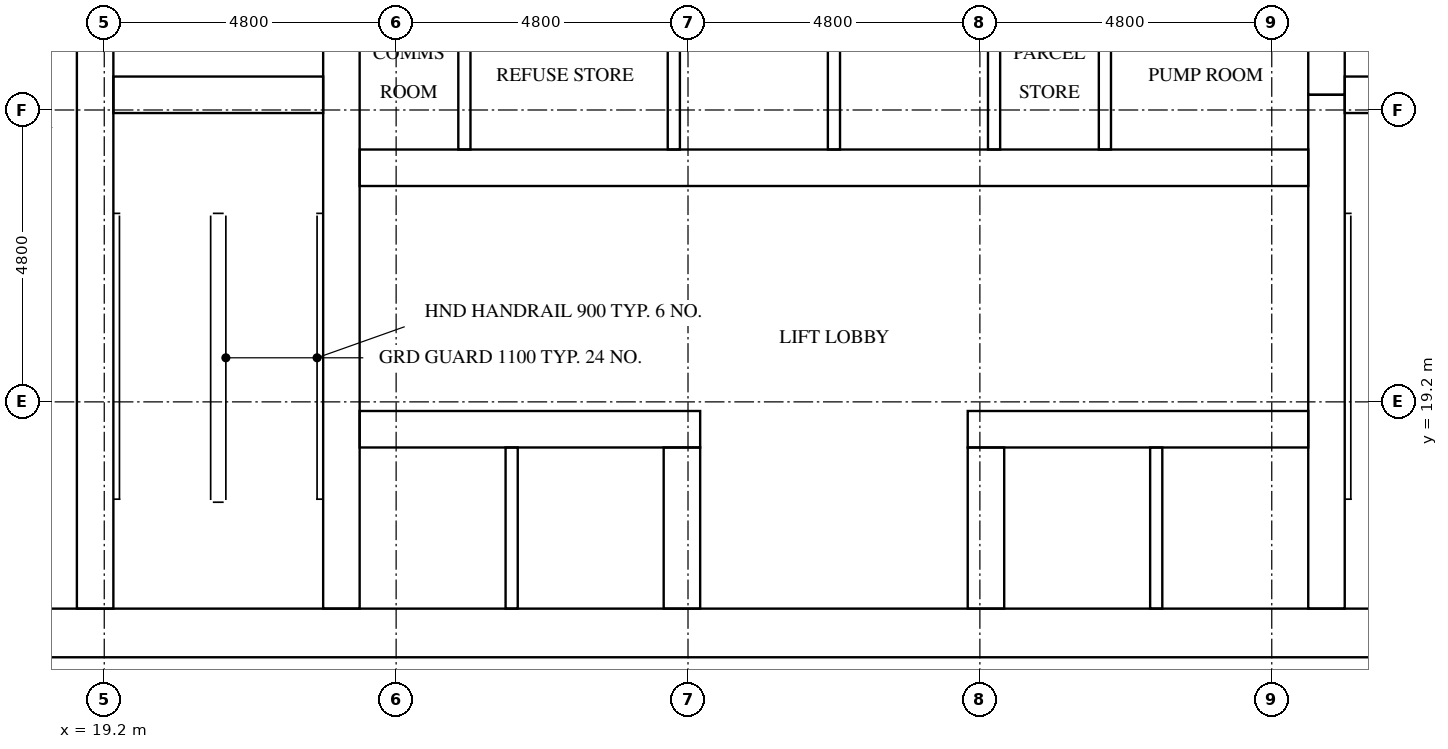
"""IFC4 building model, lengths in metres.
Left out: names, types, materials, properties, quantities, classifications, styles, units other than length and angle.
Written with IfcOpenShell. Run it as: python <this file> out.ifc"""

import sys

from ifc_helpers import new_model, si_unit, direction, frame, frame_2d, origin, place, context, subcontext, project, spatial, rectangle, extrude, element, fill, save


model = new_model("IFC4")
c1 = context("Model", 3, precision=1e-05, world=origin(), true_north=direction((0.0, 1.0)))
c2 = subcontext(c1, "Body", "Model", "MODEL_VIEW")
j1 = project(units=[si_unit("LENGTHUNIT", "METRE"), si_unit("PLANEANGLEUNIT", "RADIAN")], contexts=[c1])
p1 = place(None, origin())
s1 = spatial("IfcSite", under=j1, at=p1, CompositionType="ELEMENT")
p2 = place(p1, origin())
s2 = spatial("IfcBuilding", under=s1, at=p2, CompositionType="ELEMENT")
p3 = place(p2, frame((0.0, 0.0, 143.6)))
s3 = spatial("IfcBuildingStorey", under=s2, at=p3, CompositionType="ELEMENT", Elevation=143.6)
p4 = place(p3, frame((15.0, 15.4, 0.0), z_axis=(0.0, 0.0, 1.0), x_axis=(1.0, 0.0, 0.0)))
e1 = element("IfcWall", 1, at=p4, inside=s3, PredefinedType="SHEAR", context=c2, shape_type="SweptSolid", body=[
    extrude(rectangle(XDim=32.4, YDim=0.8, at=frame_2d((16.2, 0.0))), origin(), (0.0, 0.0, 1.0), 5.1),
])
p5 = place(p4, frame((15.3, 0.0, 0.0)))
e2 = element("IfcOpeningElement", 2, at=p5, cuts=e1, PredefinedType="OPENING", context=c2, shape_type="SweptSolid", body=[
    extrude(rectangle(XDim=1.8, YDim=2.1, at=frame_2d((0.9, 1.05))), frame((0.0, 0.41, 0.0), z_axis=(0.0, -1.0, 0.0), x_axis=(1.0, 0.0, 0.0)), (0.0, 0.0, 1.0), 0.82),
])
p6 = place(p3, frame((19.05, 15.8, 0.0), z_axis=(0.0, 0.0, 1.0), x_axis=(0.0, 1.0, 0.0)))
e3 = element("IfcWall", 3, at=p6, inside=s3, PredefinedType="SHEAR", context=c2, shape_type="SweptSolid", body=[
    extrude(rectangle(XDim=15.15, YDim=0.6, at=frame_2d((7.575, 0.0))), origin(), (0.0, 0.0, 1.0), 5.1),
])
p7 = place(p6, frame((9.65, 0.0, 0.0)))
e4 = element("IfcOpeningElement", 4, at=p7, cuts=e3, PredefinedType="OPENING", context=c2, shape_type="SweptSolid", body=[
    extrude(rectangle(XDim=1.1, YDim=2.1, at=frame_2d((0.55, 1.05))), frame((0.0, 0.31, 0.0), z_axis=(0.0, -1.0, 0.0), x_axis=(1.0, 0.0, 0.0)), (0.0, 0.0, 1.0), 0.62),
])
p8 = place(p6, frame((13.15, 0.0, 0.0)))
e5 = element("IfcOpeningElement", 5, at=p8, cuts=e3, PredefinedType="OPENING", context=c2, shape_type="SweptSolid", body=[
    extrude(rectangle(XDim=1.1, YDim=2.1, at=frame_2d((0.55, 1.05))), frame((0.0, 0.31, 0.0), z_axis=(0.0, -1.0, 0.0), x_axis=(1.0, 0.0, 0.0)), (0.0, 0.0, 1.0), 0.62),
])
p9 = place(p6, frame((0.4, 0.0, 0.0)))
e6 = element("IfcOpeningElement", 6, at=p9, cuts=e3, PredefinedType="OPENING", context=c2, shape_type="SweptSolid", body=[
    extrude(rectangle(XDim=1.2, YDim=2.1, at=frame_2d((0.6, 1.05))), frame((0.0, 0.31, 0.0), z_axis=(0.0, -1.0, 0.0), x_axis=(1.0, 0.0, 0.0)), (0.0, 0.0, 1.0), 0.62),
])
p10 = place(p3, frame((23.1, 15.8, 0.0), z_axis=(0.0, 0.0, 1.0), x_axis=(0.0, 1.0, 0.0)))
e7 = element("IfcWall", 7, at=p10, inside=s3, PredefinedType="SHEAR", context=c2, shape_type="SweptSolid", body=[
    extrude(rectangle(XDim=21.2, YDim=0.6, at=frame_2d((10.6, 0.0))), origin(), (0.0, 0.0, 1.0), 5.1),
])
p11 = place(p3, frame((39.3, 15.8, 0.0), z_axis=(0.0, 0.0, 1.0), x_axis=(0.0, 1.0, 0.0)))
e8 = element("IfcWall", 8, at=p11, inside=s3, PredefinedType="SHEAR", context=c2, shape_type="SweptSolid", body=[
    extrude(rectangle(XDim=8.45, YDim=0.6, at=frame_2d((4.225, 0.0))), origin(), (0.0, 0.0, 1.0), 5.1),
])
p12 = place(p3, frame((39.3, 24.25, 0.0), z_axis=(0.0, 0.0, 1.0), x_axis=(0.0, 1.0, 0.0)))
e9 = element("IfcWall", 9, at=p12, inside=s3, PredefinedType="SHEAR", context=c2, shape_type="SweptSolid", body=[
    extrude(rectangle(XDim=3.5, YDim=0.6, at=frame_2d((1.75, 0.0))), origin(), (0.0, 0.0, 1.0), 5.1),
])
for number, where, z_axis, x_axis in (
    (10, (19.35, 24.25, 0.0), (0.0, 0.0, 1.0), (1.0, 0.0, 0.0)),
    (11, (39.6, 24.25, 0.0), (0.0, 0.0, 1.0), (1.0, 0.0, 0.0)),
):
    element("IfcWall", number, at=place(p3, frame(where, z_axis=z_axis, x_axis=x_axis)), inside=s3, PredefinedType="SHEAR", context=c2, shape_type="SweptSolid", body=[
        extrude(rectangle(XDim=3.45, YDim=0.6, at=frame_2d((1.725, 0.0))), origin(), (0.0, 0.0, 1.0), 5.1),
    ])
p13 = place(p3, frame((23.4, 18.75, 0.0), z_axis=(0.0, 0.0, 1.0), x_axis=(1.0, 0.0, 0.0)))
e12 = element("IfcWall", 12, at=p13, inside=s3, PredefinedType="SHEAR", context=c2, shape_type="SweptSolid", body=[
    extrude(rectangle(XDim=5.6, YDim=0.6, at=frame_2d((2.8, 0.0))), origin(), (0.0, 0.0, 1.0), 5.1),
])
p14 = place(p13, frame((0.65, 0.0, 0.0)))
e13 = element("IfcOpeningElement", 13, at=p14, cuts=e12, PredefinedType="OPENING", context=c2, shape_type="SweptSolid", body=[
    extrude(rectangle(XDim=1.1, YDim=2.1, at=frame_2d((0.55, 1.05))), frame((0.0, 0.31, 0.0), z_axis=(0.0, -1.0, 0.0), x_axis=(1.0, 0.0, 0.0)), (0.0, 0.0, 1.0), 0.62),
])
p15 = place(p13, frame((3.25, 0.0, 0.0)))
e14 = element("IfcOpeningElement", 14, at=p15, cuts=e12, PredefinedType="OPENING", context=c2, shape_type="SweptSolid", body=[
    extrude(rectangle(XDim=1.1, YDim=2.1, at=frame_2d((0.55, 1.05))), frame((0.0, 0.31, 0.0), z_axis=(0.0, -1.0, 0.0), x_axis=(1.0, 0.0, 0.0)), (0.0, 0.0, 1.0), 0.62),
])
p16 = place(p3, frame((33.4, 18.75, 0.0), z_axis=(0.0, 0.0, 1.0), x_axis=(1.0, 0.0, 0.0)))
e15 = element("IfcWall", 15, at=p16, inside=s3, PredefinedType="SHEAR", context=c2, shape_type="SweptSolid", body=[
    extrude(rectangle(XDim=5.6, YDim=0.6, at=frame_2d((2.8, 0.0))), origin(), (0.0, 0.0, 1.0), 5.1),
])
p17 = place(p16, frame((1.25, 0.0, 0.0)))
e16 = element("IfcOpeningElement", 16, at=p17, cuts=e15, PredefinedType="OPENING", context=c2, shape_type="SweptSolid", body=[
    extrude(rectangle(XDim=1.1, YDim=2.1, at=frame_2d((0.55, 1.05))), frame((0.0, 0.31, 0.0), z_axis=(0.0, -1.0, 0.0), x_axis=(1.0, 0.0, 0.0)), (0.0, 0.0, 1.0), 0.62),
])
p18 = place(p16, frame((3.85, 0.0, 0.0)))
e17 = element("IfcOpeningElement", 17, at=p18, cuts=e15, PredefinedType="OPENING", context=c2, shape_type="SweptSolid", body=[
    extrude(rectangle(XDim=1.1, YDim=2.1, at=frame_2d((0.55, 1.05))), frame((0.0, 0.31, 0.0), z_axis=(0.0, -1.0, 0.0), x_axis=(1.0, 0.0, 0.0)), (0.0, 0.0, 1.0), 0.62),
])
p19 = place(p3, frame((23.4, 23.05, 0.0), z_axis=(0.0, 0.0, 1.0), x_axis=(1.0, 0.0, 0.0)))
e18 = element("IfcWall", 18, at=p19, inside=s3, PredefinedType="SHEAR", context=c2, shape_type="SweptSolid", body=[
    extrude(rectangle(XDim=15.6, YDim=0.6, at=frame_2d((7.8, 0.0))), origin(), (0.0, 0.0, 1.0), 5.1),
])
p20 = place(p19, frame((0.311, 0.0, 0.0)))
e19 = element("IfcOpeningElement", 19, at=p20, cuts=e18, PredefinedType="OPENING", context=c2, shape_type="SweptSolid", body=[
    extrude(rectangle(XDim=1.0, YDim=2.1, at=frame_2d((0.5, 1.05))), frame((0.0, 0.31, 0.0), z_axis=(0.0, -1.0, 0.0), x_axis=(1.0, 0.0, 0.0)), (0.0, 0.0, 1.0), 0.62),
])
p21 = place(p19, frame((2.945, 0.0, 0.0)))
e20 = element("IfcOpeningElement", 20, at=p21, cuts=e18, PredefinedType="OPENING", context=c2, shape_type="SweptSolid", body=[
    extrude(rectangle(XDim=1.0, YDim=2.1, at=frame_2d((0.5, 1.05))), frame((0.0, 0.31, 0.0), z_axis=(0.0, -1.0, 0.0), x_axis=(1.0, 0.0, 0.0)), (0.0, 0.0, 1.0), 0.62),
])
p22 = place(p19, frame((10.845, 0.0, 0.0)))
e21 = element("IfcOpeningElement", 21, at=p22, cuts=e18, PredefinedType="OPENING", context=c2, shape_type="SweptSolid", body=[
    extrude(rectangle(XDim=1.0, YDim=2.1, at=frame_2d((0.5, 1.05))), frame((0.0, 0.31, 0.0), z_axis=(0.0, -1.0, 0.0), x_axis=(1.0, 0.0, 0.0)), (0.0, 0.0, 1.0), 0.62),
])
p23 = place(p19, frame((13.478, 0.0, 0.0)))
e22 = element("IfcOpeningElement", 22, at=p23, cuts=e18, PredefinedType="OPENING", context=c2, shape_type="SweptSolid", body=[
    extrude(rectangle(XDim=1.0, YDim=2.1, at=frame_2d((0.5, 1.05))), frame((0.0, 0.31, 0.0), z_axis=(0.0, -1.0, 0.0), x_axis=(1.0, 0.0, 0.0)), (0.0, 0.0, 1.0), 0.62),
])
for number, where, z_axis, x_axis in (
    (23, (28.7, 15.8, 0.0), (0.0, 0.0, 1.0), (0.0, 1.0, 0.0)),
    (24, (33.7, 15.8, 0.0), (0.0, 0.0, 1.0), (0.0, 1.0, 0.0)),
):
    element("IfcWall", number, at=place(p3, frame(where, z_axis=z_axis, x_axis=x_axis)), inside=s3, PredefinedType="SHEAR", context=c2, shape_type="SweptSolid", body=[
        extrude(rectangle(XDim=2.65, YDim=0.6, at=frame_2d((1.325, 0.0))), origin(), (0.0, 0.0, 1.0), 5.1),
    ])
for number, where, z_axis, x_axis in (
    (25, (28.567, 23.35, 0.0), (0.0, 0.0, 1.0), (0.0, 1.0, 0.0)),
    (26, (31.2, 23.35, 0.0), (0.0, 0.0, 1.0), (0.0, 1.0, 0.0)),
    (27, (33.833, 23.35, 0.0), (0.0, 0.0, 1.0), (0.0, 1.0, 0.0)),
):
    element("IfcWall", number, at=place(p3, frame(where, z_axis=z_axis, x_axis=x_axis)), inside=s3, PredefinedType="SOLIDWALL", context=c2, shape_type="SweptSolid", body=[
        extrude(rectangle(XDim=2.5, YDim=0.2, at=frame_2d((1.25, 0.0))), origin(), (0.0, 0.0, 1.0), 5.1),
    ])
for number, where, z_axis, x_axis in (
    (28, (25.9, 15.8, 0.0), (0.0, 0.0, 1.0), (0.0, 1.0, 0.0)),
    (29, (36.5, 15.8, 0.0), (0.0, 0.0, 1.0), (0.0, 1.0, 0.0)),
):
    element("IfcWall", number, at=place(p3, frame(where, z_axis=z_axis, x_axis=x_axis)), inside=s3, PredefinedType="SOLIDWALL", context=c2, shape_type="SweptSolid", body=[
        extrude(rectangle(XDim=2.65, YDim=0.2, at=frame_2d((1.325, 0.0))), origin(), (0.0, 0.0, 1.0), 5.1),
    ])
for number, where, z_axis, x_axis in (
    (30, (25.123, 23.35, 0.0), (0.0, 0.0, 1.0), (0.0, 1.0, 0.0)),
    (31, (35.656, 23.35, 0.0), (0.0, 0.0, 1.0), (0.0, 1.0, 0.0)),
):
    element("IfcWall", number, at=place(p3, frame(where, z_axis=z_axis, x_axis=x_axis)), inside=s3, PredefinedType="PARTITIONING", context=c2, shape_type="SweptSolid", body=[
        extrude(rectangle(XDim=2.5, YDim=0.2, at=frame_2d((1.25, 0.0))), origin(), (0.0, 0.0, 1.0), 5.1),
    ])
p24 = place(p14, origin())
e32 = element("IfcDoor", 32, at=p24, inside=s3, OperationType="DOUBLE_DOOR_SLIDING", PredefinedType="DOOR", context=c2, shape_type="SweptSolid", body=[
    extrude(rectangle(XDim=1.1, YDim=2.1, at=frame_2d((0.55, 1.05))), frame((0.0, 0.025, 0.0), z_axis=(0.0, -1.0, 0.0), x_axis=(1.0, 0.0, 0.0)), (0.0, 0.0, 1.0), 0.05),
])
fill(e13, e32)
p25 = place(p15, origin())
e33 = element("IfcDoor", 33, at=p25, inside=s3, OperationType="DOUBLE_DOOR_SLIDING", PredefinedType="DOOR", context=c2, shape_type="SweptSolid", body=[
    extrude(rectangle(XDim=1.1, YDim=2.1, at=frame_2d((0.55, 1.05))), frame((0.0, 0.025, 0.0), z_axis=(0.0, -1.0, 0.0), x_axis=(1.0, 0.0, 0.0)), (0.0, 0.0, 1.0), 0.05),
])
fill(e14, e33)
p26 = place(p17, origin())
e34 = element("IfcDoor", 34, at=p26, inside=s3, OperationType="DOUBLE_DOOR_SLIDING", PredefinedType="DOOR", context=c2, shape_type="SweptSolid", body=[
    extrude(rectangle(XDim=1.1, YDim=2.1, at=frame_2d((0.55, 1.05))), frame((0.0, 0.025, 0.0), z_axis=(0.0, -1.0, 0.0), x_axis=(1.0, 0.0, 0.0)), (0.0, 0.0, 1.0), 0.05),
])
fill(e16, e34)
p27 = place(p18, origin())
e35 = element("IfcDoor", 35, at=p27, inside=s3, OperationType="DOUBLE_DOOR_SLIDING", PredefinedType="DOOR", context=c2, shape_type="SweptSolid", body=[
    extrude(rectangle(XDim=1.1, YDim=2.1, at=frame_2d((0.55, 1.05))), frame((0.0, 0.025, 0.0), z_axis=(0.0, -1.0, 0.0), x_axis=(1.0, 0.0, 0.0)), (0.0, 0.0, 1.0), 0.05),
])
fill(e17, e35)
p28 = place(p9, frame((1.2, 0.0, 0.0), z_axis=(0.0, 0.0, 1.0), x_axis=(-1.0, 0.0, 0.0)))
e36 = element("IfcDoor", 36, at=p28, inside=s3, OperationType="SINGLE_SWING_LEFT", PredefinedType="DOOR", context=c2, shape_type="SweptSolid", body=[
    extrude(rectangle(XDim=1.2, YDim=2.1, at=frame_2d((0.6, 1.05))), frame((0.0, 0.025, 0.0), z_axis=(0.0, -1.0, 0.0), x_axis=(1.0, 0.0, 0.0)), (0.0, 0.0, 1.0), 0.05),
])
fill(e6, e36)
p29 = place(p5, frame((1.8, 0.0, 0.0), z_axis=(0.0, 0.0, 1.0), x_axis=(-1.0, 0.0, 0.0)))
e37 = element("IfcDoor", 37, at=p29, inside=s3, OperationType="DOUBLE_DOOR_SINGLE_SWING", PredefinedType="DOOR", context=c2, shape_type="SweptSolid", body=[
    extrude(rectangle(XDim=1.8, YDim=2.1, at=frame_2d((0.9, 1.05))), frame((0.0, 0.025, 0.0), z_axis=(0.0, -1.0, 0.0), x_axis=(1.0, 0.0, 0.0)), (0.0, 0.0, 1.0), 0.05),
])
fill(e2, e37)
p30 = place(p20, frame((1.0, 0.0, 0.0), z_axis=(0.0, 0.0, 1.0), x_axis=(-1.0, 0.0, 0.0)))
e38 = element("IfcDoor", 38, at=p30, inside=s3, OperationType="SINGLE_SWING_RIGHT", PredefinedType="DOOR", context=c2, shape_type="SweptSolid", body=[
    extrude(rectangle(XDim=1.0, YDim=2.1, at=frame_2d((0.5, 1.05))), frame((0.0, 0.025, 0.0), z_axis=(0.0, -1.0, 0.0), x_axis=(1.0, 0.0, 0.0)), (0.0, 0.0, 1.0), 0.05),
])
fill(e19, e38)
p31 = place(p21, frame((1.0, 0.0, 0.0), z_axis=(0.0, 0.0, 1.0), x_axis=(-1.0, 0.0, 0.0)))
e39 = element("IfcDoor", 39, at=p31, inside=s3, OperationType="SINGLE_SWING_LEFT", PredefinedType="DOOR", context=c2, shape_type="SweptSolid", body=[
    extrude(rectangle(XDim=1.0, YDim=2.1, at=frame_2d((0.5, 1.05))), frame((0.0, 0.025, 0.0), z_axis=(0.0, -1.0, 0.0), x_axis=(1.0, 0.0, 0.0)), (0.0, 0.0, 1.0), 0.05),
])
fill(e20, e39)
p32 = place(p22, frame((1.0, 0.0, 0.0), z_axis=(0.0, 0.0, 1.0), x_axis=(-1.0, 0.0, 0.0)))
e40 = element("IfcDoor", 40, at=p32, inside=s3, OperationType="SINGLE_SWING_RIGHT", PredefinedType="DOOR", context=c2, shape_type="SweptSolid", body=[
    extrude(rectangle(XDim=1.0, YDim=2.1, at=frame_2d((0.5, 1.05))), frame((0.0, 0.025, 0.0), z_axis=(0.0, -1.0, 0.0), x_axis=(1.0, 0.0, 0.0)), (0.0, 0.0, 1.0), 0.05),
])
fill(e21, e40)
p33 = place(p23, frame((1.0, 0.0, 0.0), z_axis=(0.0, 0.0, 1.0), x_axis=(-1.0, 0.0, 0.0)))
e41 = element("IfcDoor", 41, at=p33, inside=s3, OperationType="SINGLE_SWING_LEFT", PredefinedType="DOOR", context=c2, shape_type="SweptSolid", body=[
    extrude(rectangle(XDim=1.0, YDim=2.1, at=frame_2d((0.5, 1.05))), frame((0.0, 0.025, 0.0), z_axis=(0.0, -1.0, 0.0), x_axis=(1.0, 0.0, 0.0)), (0.0, 0.0, 1.0), 0.05),
])
fill(e22, e41)
save(model, sys.argv[1])
